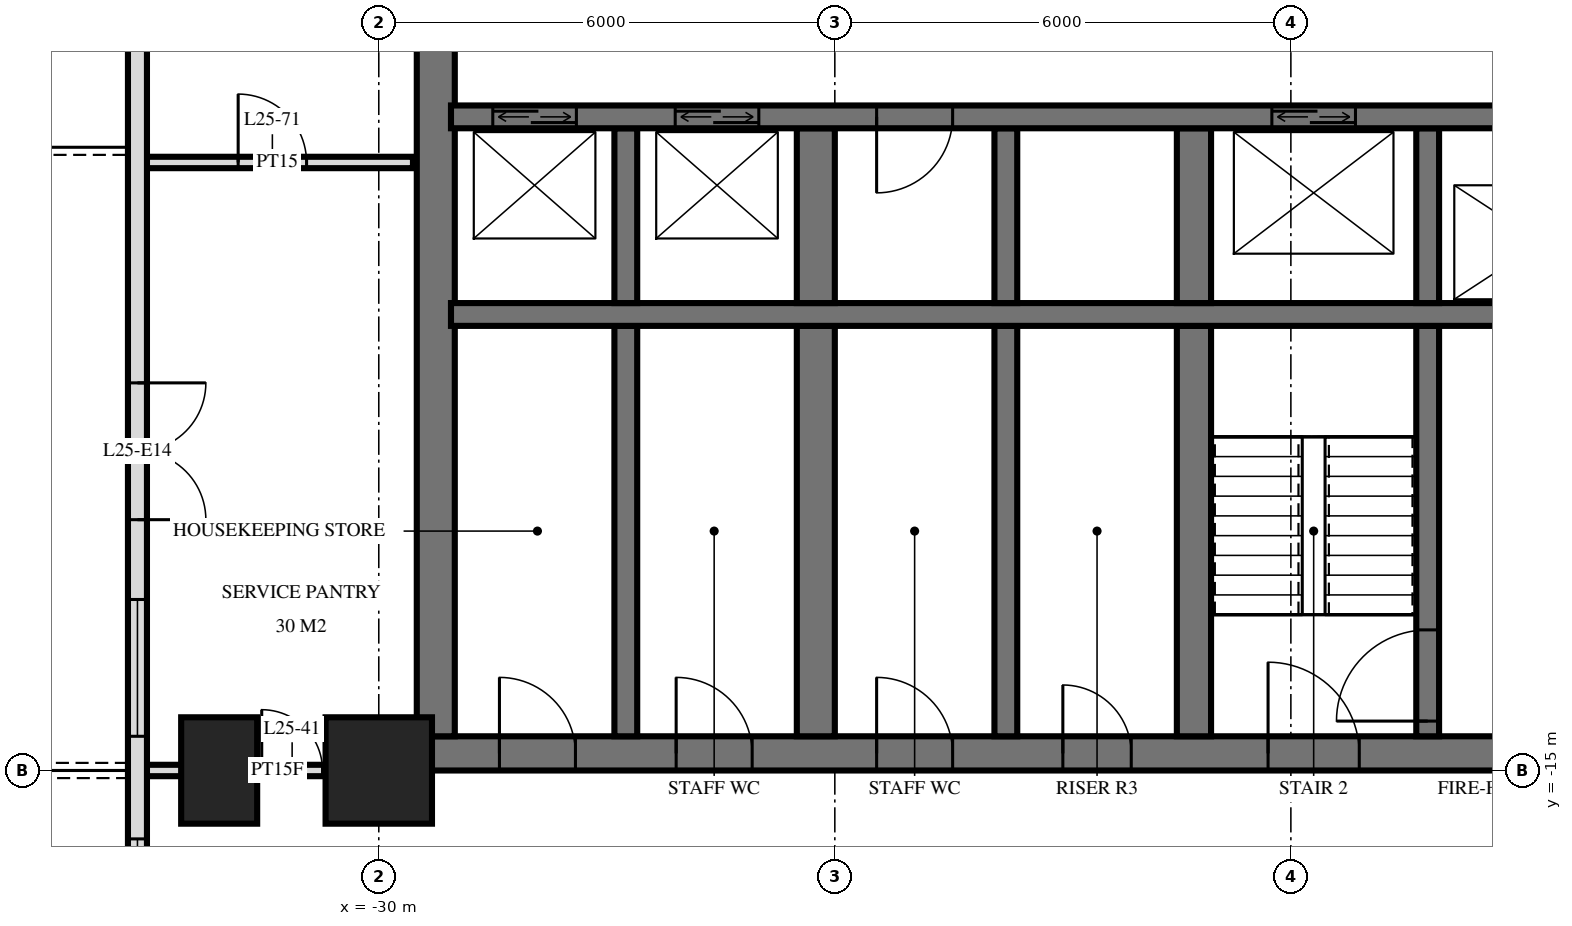
"""IFC4 building model, lengths in metres.
Left out: names, types, materials, properties, quantities, classifications, styles, units other than length and angle.
Written with IfcOpenShell. Run it as: python <this file> out.ifc"""

import sys

from ifc_helpers import new_model, si_unit, direction, frame, frame_2d, origin, origin_2d, place, context, subcontext, project, spatial, rectangle, extrude, element, fill, save


model = new_model("IFC4")
c1 = context("Model", 3, precision=1e-05, world=origin(), true_north=direction((0.0, 1.0)))
c2 = subcontext(c1, "Body", "Model", "MODEL_VIEW")
j1 = project(units=[si_unit("LENGTHUNIT", "METRE"), si_unit("PLANEANGLEUNIT", "RADIAN")], contexts=[c1])
p1 = place(None, origin())
s1 = spatial("IfcSite", under=j1, at=p1, CompositionType="ELEMENT")
p2 = place(p1, origin())
s2 = spatial("IfcBuilding", under=s1, at=p2, CompositionType="ELEMENT")
p3 = place(p2, frame((0.0, 0.0, 99.6)))
s3 = spatial("IfcBuildingStorey", under=s2, at=p3, CompositionType="ELEMENT", Elevation=99.6)
p4 = place(p3, frame((-32.1, -15.0, 0.0), z_axis=(0.0, 0.0, 1.0), x_axis=(0.0, 1.0, 0.0)))
e1 = element("IfcColumn", 1, at=p4, inside=s3, PredefinedType="COLUMN", context=c2, shape_type="SweptSolid", body=[
    extrude(rectangle(XDim=1.4, YDim=1.0, at=origin_2d()), origin(), (0.0, 0.0, 1.0), 3.6),
])
p5 = place(p3, frame((-30.0, -15.0, 0.0), z_axis=(0.0, 0.0, 1.0), x_axis=(1.0, 0.0, 0.0)))
e2 = element("IfcColumn", 2, at=p5, inside=s3, PredefinedType="COLUMN", context=c2, shape_type="SweptSolid", body=[
    extrude(rectangle(XDim=1.4, YDim=1.4, at=origin_2d()), origin(), (0.0, 0.0, 1.0), 3.6),
])
p6 = place(p3, frame((-29.5, -14.775, 0.0), z_axis=(0.0, 0.0, 1.0), x_axis=(1.0, 0.0, 0.0)))
e3 = element("IfcWall", 3, at=p6, inside=s3, PredefinedType="SHEAR", context=c2, shape_type="SweptSolid", body=[
    extrude(rectangle(XDim=19.5, YDim=0.45, at=frame_2d((9.75, 0.0))), origin(), (0.0, 0.0, 1.0), 3.6),
])
p7 = place(p6, frame((11.2, 0.0, 0.0)))
e4 = element("IfcOpeningElement", 4, at=p7, cuts=e3, PredefinedType="OPENING", context=c2, shape_type="SweptSolid", body=[
    extrude(rectangle(XDim=1.2, YDim=2.1, at=frame_2d((0.6, 1.05))), frame((0.0, 0.235, 0.0), z_axis=(0.0, -1.0, 0.0), x_axis=(1.0, 0.0, 0.0)), (0.0, 0.0, 1.0), 0.47),
])
p8 = place(p6, frame((14.25, 0.0, 0.0)))
e5 = element("IfcOpeningElement", 5, at=p8, cuts=e3, PredefinedType="OPENING", context=c2, shape_type="SweptSolid", body=[
    extrude(rectangle(XDim=1.1, YDim=2.1, at=frame_2d((0.55, 1.05))), frame((0.0, 0.235, 0.0), z_axis=(0.0, -1.0, 0.0), x_axis=(1.0, 0.0, 0.0)), (0.0, 0.0, 1.0), 0.47),
])
p9 = place(p6, frame((8.5, 0.0, 0.0)))
e6 = element("IfcOpeningElement", 6, at=p9, cuts=e3, PredefinedType="OPENING", context=c2, shape_type="SweptSolid", body=[
    extrude(rectangle(XDim=0.9, YDim=2.1, at=frame_2d((0.45, 1.05))), frame((0.0, 0.235, 0.0), z_axis=(0.0, -1.0, 0.0), x_axis=(1.0, 0.0, 0.0)), (0.0, 0.0, 1.0), 0.47),
])
p10 = place(p6, frame((6.05, 0.0, 0.0)))
e7 = element("IfcOpeningElement", 7, at=p10, cuts=e3, PredefinedType="OPENING", context=c2, shape_type="SweptSolid", body=[
    extrude(rectangle(XDim=1.0, YDim=2.1, at=frame_2d((0.5, 1.05))), frame((0.0, 0.235, 0.0), z_axis=(0.0, -1.0, 0.0), x_axis=(1.0, 0.0, 0.0)), (0.0, 0.0, 1.0), 0.47),
])
p11 = place(p6, frame((3.413, 0.0, 0.0)))
e8 = element("IfcOpeningElement", 8, at=p11, cuts=e3, PredefinedType="OPENING", context=c2, shape_type="SweptSolid", body=[
    extrude(rectangle(XDim=1.0, YDim=2.1, at=frame_2d((0.5, 1.05))), frame((0.0, 0.235, 0.0), z_axis=(0.0, -1.0, 0.0), x_axis=(1.0, 0.0, 0.0)), (0.0, 0.0, 1.0), 0.47),
])
p12 = place(p6, frame((1.087, 0.0, 0.0)))
e9 = element("IfcOpeningElement", 9, at=p12, cuts=e3, PredefinedType="OPENING", context=c2, shape_type="SweptSolid", body=[
    extrude(rectangle(XDim=1.0, YDim=2.1, at=frame_2d((0.5, 1.05))), frame((0.0, 0.235, 0.0), z_axis=(0.0, -1.0, 0.0), x_axis=(1.0, 0.0, 0.0)), (0.0, 0.0, 1.0), 0.47),
])
p13 = place(p3, frame((-29.25, -14.55, 0.0), z_axis=(0.0, 0.0, 1.0), x_axis=(0.0, 1.0, 0.0)))
e10 = element("IfcWall", 10, at=p13, inside=s3, PredefinedType="SHEAR", context=c2, shape_type="SweptSolid", body=[
    extrude(rectangle(XDim=14.1, YDim=0.5, at=frame_2d((7.05, 0.0))), origin(), (0.0, 0.0, 1.0), 3.6),
])
p14 = place(p3, frame((-29.05, -6.4, 0.0), z_axis=(0.0, 0.0, 1.0), x_axis=(1.0, 0.0, 0.0)))
e11 = element("IfcWall", 11, at=p14, inside=s3, PredefinedType="SHEAR", context=c2, shape_type="SweptSolid", body=[
    extrude(rectangle(XDim=18.7, YDim=0.3, at=frame_2d((9.35, 0.0))), origin(), (0.0, 0.0, 1.0), 3.6),
])
p15 = place(p14, frame((2.95, 0.0, 0.0)))
e12 = element("IfcOpeningElement", 12, at=p15, cuts=e11, PredefinedType="OPENING", context=c2, shape_type="SweptSolid", body=[
    extrude(rectangle(XDim=1.1, YDim=2.1, at=frame_2d((0.55, 1.05))), frame((0.0, 0.16, 0.0), z_axis=(0.0, -1.0, 0.0), x_axis=(1.0, 0.0, 0.0)), (0.0, 0.0, 1.0), 0.32),
])
p16 = place(p14, frame((0.55, 0.0, 0.0)))
e13 = element("IfcOpeningElement", 13, at=p16, cuts=e11, PredefinedType="OPENING", context=c2, shape_type="SweptSolid", body=[
    extrude(rectangle(XDim=1.1, YDim=2.1, at=frame_2d((0.55, 1.05))), frame((0.0, 0.16, 0.0), z_axis=(0.0, -1.0, 0.0), x_axis=(1.0, 0.0, 0.0)), (0.0, 0.0, 1.0), 0.32),
])
p17 = place(p14, frame((10.8, 0.0, 0.0)))
e14 = element("IfcOpeningElement", 14, at=p17, cuts=e11, PredefinedType="OPENING", context=c2, shape_type="SweptSolid", body=[
    extrude(rectangle(XDim=1.1, YDim=2.1, at=frame_2d((0.55, 1.05))), frame((0.0, 0.16, 0.0), z_axis=(0.0, -1.0, 0.0), x_axis=(1.0, 0.0, 0.0)), (0.0, 0.0, 1.0), 0.32),
])
p18 = place(p14, frame((5.6, 0.0, 0.0)))
e15 = element("IfcOpeningElement", 15, at=p18, cuts=e11, PredefinedType="OPENING", context=c2, shape_type="SweptSolid", body=[
    extrude(rectangle(XDim=1.0, YDim=2.1, at=frame_2d((0.5, 1.05))), frame((0.0, 0.16, 0.0), z_axis=(0.0, -1.0, 0.0), x_axis=(1.0, 0.0, 0.0)), (0.0, 0.0, 1.0), 0.32),
])
p19 = place(p3, frame((-29.05, -9.0, 0.0), z_axis=(0.0, 0.0, 1.0), x_axis=(1.0, 0.0, 0.0)))
e16 = element("IfcWall", 16, at=p19, inside=s3, PredefinedType="SHEAR", context=c2, shape_type="SweptSolid", body=[
    extrude(rectangle(XDim=18.7, YDim=0.3, at=frame_2d((9.35, 0.0))), origin(), (0.0, 0.0, 1.0), 3.6),
])
p20 = place(p19, frame((13.8, 0.0, 0.0)))
e17 = element("IfcOpeningElement", 17, at=p20, cuts=e16, PredefinedType="OPENING", context=c2, shape_type="SweptSolid", body=[
    extrude(rectangle(XDim=1.1, YDim=2.1, at=frame_2d((0.55, 1.05))), frame((0.0, 0.16, 0.0), z_axis=(0.0, -1.0, 0.0), x_axis=(1.0, 0.0, 0.0)), (0.0, 0.0, 1.0), 0.32),
])
p21 = place(p3, frame((-16.2, -8.85, 0.0), z_axis=(0.0, 0.0, 1.0), x_axis=(0.0, 1.0, 0.0)))
e18 = element("IfcWall", 18, at=p21, inside=s3, PredefinedType="SHEAR", context=c2, shape_type="SweptSolid", body=[
    extrude(rectangle(XDim=2.3, YDim=0.3, at=frame_2d((1.15, 0.0))), origin(), (0.0, 0.0, 1.0), 3.6),
])
p22 = place(p3, frame((-16.2, -14.55, 0.0), z_axis=(0.0, 0.0, 1.0), x_axis=(0.0, 1.0, 0.0)))
e19 = element("IfcWall", 19, at=p22, inside=s3, PredefinedType="SHEAR", context=c2, shape_type="SweptSolid", body=[
    extrude(rectangle(XDim=5.4, YDim=0.3, at=frame_2d((2.7, 0.0))), origin(), (0.0, 0.0, 1.0), 3.6),
])
p23 = place(p22, frame((0.2, 0.0, 0.0)))
e20 = element("IfcOpeningElement", 20, at=p23, cuts=e19, PredefinedType="OPENING", context=c2, shape_type="SweptSolid", body=[
    extrude(rectangle(XDim=1.2, YDim=2.1, at=frame_2d((0.6, 1.05))), frame((0.0, 0.16, 0.0), z_axis=(0.0, -1.0, 0.0), x_axis=(1.0, 0.0, 0.0)), (0.0, 0.0, 1.0), 0.32),
])
p24 = place(p3, frame((-19.275, -8.85, 0.0), z_axis=(0.0, 0.0, 1.0), x_axis=(0.0, 1.0, 0.0)))
e21 = element("IfcWall", 21, at=p24, inside=s3, PredefinedType="SHEAR", context=c2, shape_type="SweptSolid", body=[
    extrude(rectangle(XDim=2.3, YDim=0.45, at=frame_2d((1.15, 0.0))), origin(), (0.0, 0.0, 1.0), 3.6),
])
p25 = place(p3, frame((-19.275, -14.55, 0.0), z_axis=(0.0, 0.0, 1.0), x_axis=(0.0, 1.0, 0.0)))
e22 = element("IfcWall", 22, at=p25, inside=s3, PredefinedType="SHEAR", context=c2, shape_type="SweptSolid", body=[
    extrude(rectangle(XDim=5.4, YDim=0.45, at=frame_2d((2.7, 0.0))), origin(), (0.0, 0.0, 1.0), 3.6),
])
p26 = place(p3, frame((-21.75, -8.85, 0.0), z_axis=(0.0, 0.0, 1.0), x_axis=(0.0, 1.0, 0.0)))
e23 = element("IfcWall", 23, at=p26, inside=s3, PredefinedType="SHEAR", context=c2, shape_type="SweptSolid", body=[
    extrude(rectangle(XDim=2.3, YDim=0.3, at=frame_2d((1.15, 0.0))), origin(), (0.0, 0.0, 1.0), 3.6),
])
p27 = place(p3, frame((-21.75, -14.55, 0.0), z_axis=(0.0, 0.0, 1.0), x_axis=(0.0, 1.0, 0.0)))
e24 = element("IfcWall", 24, at=p27, inside=s3, PredefinedType="SHEAR", context=c2, shape_type="SweptSolid", body=[
    extrude(rectangle(XDim=5.4, YDim=0.3, at=frame_2d((2.7, 0.0))), origin(), (0.0, 0.0, 1.0), 3.6),
])
p28 = place(p3, frame((-24.25, -8.85, 0.0), z_axis=(0.0, 0.0, 1.0), x_axis=(0.0, 1.0, 0.0)))
e25 = element("IfcWall", 25, at=p28, inside=s3, PredefinedType="SHEAR", context=c2, shape_type="SweptSolid", body=[
    extrude(rectangle(XDim=2.3, YDim=0.5, at=frame_2d((1.15, 0.0))), origin(), (0.0, 0.0, 1.0), 3.6),
])
p29 = place(p3, frame((-24.25, -14.55, 0.0), z_axis=(0.0, 0.0, 1.0), x_axis=(0.0, 1.0, 0.0)))
e26 = element("IfcWall", 26, at=p29, inside=s3, PredefinedType="SHEAR", context=c2, shape_type="SweptSolid", body=[
    extrude(rectangle(XDim=5.4, YDim=0.5, at=frame_2d((2.7, 0.0))), origin(), (0.0, 0.0, 1.0), 3.6),
])
p30 = place(p3, frame((-26.75, -8.85, 0.0), z_axis=(0.0, 0.0, 1.0), x_axis=(0.0, 1.0, 0.0)))
e27 = element("IfcWall", 27, at=p30, inside=s3, PredefinedType="SHEAR", context=c2, shape_type="SweptSolid", body=[
    extrude(rectangle(XDim=2.3, YDim=0.3, at=frame_2d((1.15, 0.0))), origin(), (0.0, 0.0, 1.0), 3.6),
])
p31 = place(p3, frame((-26.75, -14.55, 0.0), z_axis=(0.0, 0.0, 1.0), x_axis=(0.0, 1.0, 0.0)))
e28 = element("IfcWall", 28, at=p31, inside=s3, PredefinedType="SHEAR", context=c2, shape_type="SweptSolid", body=[
    extrude(rectangle(XDim=5.4, YDim=0.3, at=frame_2d((2.7, 0.0))), origin(), (0.0, 0.0, 1.0), 3.6),
])
p32 = place(p3, frame((-33.175, -3.325, 0.0), z_axis=(0.0, 0.0, 1.0), x_axis=(0.0, -1.0, 0.0)))
e29 = element("IfcWall", 29, at=p32, inside=s3, PredefinedType="SOLIDWALL", context=c2, shape_type="SweptSolid", body=[
    extrude(rectangle(XDim=21.551, YDim=0.25, at=frame_2d((10.775, 0.0))), origin(), (0.0, 0.0, 1.0), 3.32),
])
p33 = place(p32, frame((6.575, 0.0, 0.0)))
e30 = element("IfcOpeningElement", 30, at=p33, cuts=e29, PredefinedType="OPENING", context=c2, shape_type="SweptSolid", body=[
    extrude(rectangle(XDim=1.8, YDim=2.4, at=frame_2d((0.9, 1.2))), frame((0.0, 0.135, 0.0), z_axis=(0.0, -1.0, 0.0), x_axis=(1.0, 0.0, 0.0)), (0.0, 0.0, 1.0), 0.27),
])
p34 = place(p32, frame((9.425, 0.0, 0.3)))
e31 = element("IfcOpeningElement", 31, at=p34, cuts=e29, PredefinedType="OPENING", context=c2, shape_type="SweptSolid", body=[
    extrude(rectangle(XDim=1.8, YDim=2.1, at=frame_2d((0.9, 1.05))), frame((0.0, 0.135, 0.0), z_axis=(0.0, -1.0, 0.0), x_axis=(1.0, 0.0, 0.0)), (0.0, 0.0, 1.0), 0.27),
])
p35 = place(p32, frame((12.575, 0.0, 0.3)))
e32 = element("IfcOpeningElement", 32, at=p35, cuts=e29, PredefinedType="OPENING", context=c2, shape_type="SweptSolid", body=[
    extrude(rectangle(XDim=1.2, YDim=2.1, at=frame_2d((0.6, 1.05))), frame((0.0, 0.135, 0.0), z_axis=(0.0, -1.0, 0.0), x_axis=(1.0, 0.0, 0.0)), (0.0, 0.0, 1.0), 0.27),
])
p36 = place(p32, frame((15.575, 0.0, 0.0)))
e33 = element("IfcOpeningElement", 33, at=p36, cuts=e29, PredefinedType="OPENING", context=c2, shape_type="SweptSolid", body=[
    extrude(rectangle(XDim=1.8, YDim=2.4, at=frame_2d((0.9, 1.2))), frame((0.0, 0.135, 0.0), z_axis=(0.0, -1.0, 0.0), x_axis=(1.0, 0.0, 0.0)), (0.0, 0.0, 1.0), 0.27),
])
p37 = place(p32, frame((18.875, 0.0, 0.0)))
e34 = element("IfcOpeningElement", 34, at=p37, cuts=e29, PredefinedType="OPENING", context=c2, shape_type="SweptSolid", body=[
    extrude(rectangle(XDim=1.8, YDim=2.4, at=frame_2d((0.9, 1.2))), frame((0.0, 0.135, 0.0), z_axis=(0.0, -1.0, 0.0), x_axis=(1.0, 0.0, 0.0)), (0.0, 0.0, 1.0), 0.27),
])
p38 = place(p3, frame((-33.12, -15.0, 0.0), z_axis=(0.0, 0.0, 1.0), x_axis=(1.0, 0.0, 0.0)))
e35 = element("IfcWall", 35, at=p38, inside=s3, PredefinedType="PARTITIONING", context=c2, shape_type="SweptSolid", body=[
    extrude(rectangle(XDim=3.57, YDim=0.15, at=frame_2d((1.785, 0.0))), origin(), (0.0, 0.0, 1.0), 3.32),
])
p39 = place(p38, frame((1.58, 0.0, 0.0)))
e36 = element("IfcOpeningElement", 36, at=p39, cuts=e35, PredefinedType="OPENING", context=c2, shape_type="SweptSolid", body=[
    extrude(rectangle(XDim=0.8, YDim=2.1, at=frame_2d((0.4, 1.05))), frame((0.0, 0.085, 0.0), z_axis=(0.0, -1.0, 0.0), x_axis=(1.0, 0.0, 0.0)), (0.0, 0.0, 1.0), 0.17),
])
p40 = place(p3, frame((-33.12, -7.0, 0.0), z_axis=(0.0, 0.0, 1.0), x_axis=(1.0, 0.0, 0.0)))
e37 = element("IfcWall", 37, at=p40, inside=s3, PredefinedType="PARTITIONING", context=c2, shape_type="SweptSolid", body=[
    extrude(rectangle(XDim=3.57, YDim=0.15, at=frame_2d((1.785, 0.0))), origin(), (0.0, 0.0, 1.0), 3.32),
])
p41 = place(p40, frame((1.27, 0.0, 0.0)))
e38 = element("IfcOpeningElement", 38, at=p41, cuts=e37, PredefinedType="OPENING", context=c2, shape_type="SweptSolid", body=[
    extrude(rectangle(XDim=0.9, YDim=2.1, at=frame_2d((0.45, 1.05))), frame((0.0, 0.085, 0.0), z_axis=(0.0, -1.0, 0.0), x_axis=(1.0, 0.0, 0.0)), (0.0, 0.0, 1.0), 0.17),
])
p42 = place(p33, origin())
e39 = element("IfcDoor", 39, at=p42, inside=s3, OperationType="DOUBLE_DOOR_SINGLE_SWING", PredefinedType="DOOR", context=c2, shape_type="SweptSolid", body=[
    extrude(rectangle(XDim=1.8, YDim=2.4, at=frame_2d((0.9, 1.2))), frame((0.0, 0.025, 0.0), z_axis=(0.0, -1.0, 0.0), x_axis=(1.0, 0.0, 0.0)), (0.0, 0.0, 1.0), 0.05),
])
fill(e30, e39)
p43 = place(p34, origin())
e40 = element("IfcWindow", 40, at=p43, inside=s3, PartitioningType="SINGLE_PANEL", PredefinedType="WINDOW", context=c2, shape_type="SweptSolid", body=[
    extrude(rectangle(XDim=1.8, YDim=2.1, at=frame_2d((0.9, 1.05))), frame((0.0, 0.03, 0.0), z_axis=(0.0, -1.0, 0.0), x_axis=(1.0, 0.0, 0.0)), (0.0, 0.0, 1.0), 0.06),
])
fill(e31, e40)
p44 = place(p35, origin())
e41 = element("IfcWindow", 41, at=p44, inside=s3, PartitioningType="SINGLE_PANEL", PredefinedType="WINDOW", context=c2, shape_type="SweptSolid", body=[
    extrude(rectangle(XDim=1.2, YDim=2.1, at=frame_2d((0.6, 1.05))), frame((0.0, 0.03, 0.0), z_axis=(0.0, -1.0, 0.0), x_axis=(1.0, 0.0, 0.0)), (0.0, 0.0, 1.0), 0.06),
])
fill(e32, e41)
p45 = place(p15, origin())
e42 = element("IfcDoor", 42, at=p45, inside=s3, OperationType="DOUBLE_DOOR_SLIDING", PredefinedType="USERDEFINED", context=c2, shape_type="SweptSolid", body=[
    extrude(rectangle(XDim=1.1, YDim=2.1, at=frame_2d((0.55, 1.05))), frame((0.0, 0.025, 0.0), z_axis=(0.0, -1.0, 0.0), x_axis=(1.0, 0.0, 0.0)), (0.0, 0.0, 1.0), 0.05),
])
fill(e12, e42)
p46 = place(p16, origin())
e43 = element("IfcDoor", 43, at=p46, inside=s3, OperationType="DOUBLE_DOOR_SLIDING", PredefinedType="USERDEFINED", context=c2, shape_type="SweptSolid", body=[
    extrude(rectangle(XDim=1.1, YDim=2.1, at=frame_2d((0.55, 1.05))), frame((0.0, 0.025, 0.0), z_axis=(0.0, -1.0, 0.0), x_axis=(1.0, 0.0, 0.0)), (0.0, 0.0, 1.0), 0.05),
])
fill(e13, e43)
p47 = place(p17, origin())
e44 = element("IfcDoor", 44, at=p47, inside=s3, OperationType="DOUBLE_DOOR_SLIDING", PredefinedType="USERDEFINED", context=c2, shape_type="SweptSolid", body=[
    extrude(rectangle(XDim=1.1, YDim=2.1, at=frame_2d((0.55, 1.05))), frame((0.0, 0.025, 0.0), z_axis=(0.0, -1.0, 0.0), x_axis=(1.0, 0.0, 0.0)), (0.0, 0.0, 1.0), 0.05),
])
fill(e14, e44)
p48 = place(p7, origin())
e45 = element("IfcDoor", 45, at=p48, inside=s3, OperationType="SINGLE_SWING_RIGHT", PredefinedType="DOOR", context=c2, shape_type="SweptSolid", body=[
    extrude(rectangle(XDim=1.2, YDim=2.1, at=frame_2d((0.6, 1.05))), frame((0.0, 0.025, 0.0), z_axis=(0.0, -1.0, 0.0), x_axis=(1.0, 0.0, 0.0)), (0.0, 0.0, 1.0), 0.05),
])
fill(e4, e45)
p49 = place(p9, origin())
e46 = element("IfcDoor", 46, at=p49, inside=s3, OperationType="SINGLE_SWING_RIGHT", PredefinedType="DOOR", context=c2, shape_type="SweptSolid", body=[
    extrude(rectangle(XDim=0.9, YDim=2.1, at=frame_2d((0.45, 1.05))), frame((0.0, 0.025, 0.0), z_axis=(0.0, -1.0, 0.0), x_axis=(1.0, 0.0, 0.0)), (0.0, 0.0, 1.0), 0.05),
])
fill(e6, e46)
p50 = place(p10, origin())
e47 = element("IfcDoor", 47, at=p50, inside=s3, OperationType="SINGLE_SWING_RIGHT", PredefinedType="DOOR", context=c2, shape_type="SweptSolid", body=[
    extrude(rectangle(XDim=1.0, YDim=2.1, at=frame_2d((0.5, 1.05))), frame((0.0, 0.025, 0.0), z_axis=(0.0, -1.0, 0.0), x_axis=(1.0, 0.0, 0.0)), (0.0, 0.0, 1.0), 0.05),
])
fill(e7, e47)
p51 = place(p11, origin())
e48 = element("IfcDoor", 48, at=p51, inside=s3, OperationType="SINGLE_SWING_RIGHT", PredefinedType="DOOR", context=c2, shape_type="SweptSolid", body=[
    extrude(rectangle(XDim=1.0, YDim=2.1, at=frame_2d((0.5, 1.05))), frame((0.0, 0.025, 0.0), z_axis=(0.0, -1.0, 0.0), x_axis=(1.0, 0.0, 0.0)), (0.0, 0.0, 1.0), 0.05),
])
fill(e8, e48)
p52 = place(p12, origin())
e49 = element("IfcDoor", 49, at=p52, inside=s3, OperationType="SINGLE_SWING_RIGHT", PredefinedType="DOOR", context=c2, shape_type="SweptSolid", body=[
    extrude(rectangle(XDim=1.0, YDim=2.1, at=frame_2d((0.5, 1.05))), frame((0.0, 0.025, 0.0), z_axis=(0.0, -1.0, 0.0), x_axis=(1.0, 0.0, 0.0)), (0.0, 0.0, 1.0), 0.05),
])
fill(e9, e49)
p53 = place(p18, frame((0.5, 0.0, 0.0), z_axis=(0.0, 0.0, 1.0), x_axis=(-1.0, 0.0, 0.0)))
e50 = element("IfcDoor", 50, at=p53, inside=s3, OperationType="SINGLE_SWING_LEFT", PredefinedType="DOOR", context=c2, shape_type="SweptSolid", body=[
    extrude(rectangle(XDim=1.0, YDim=2.1, at=frame_2d((0.0, 1.05))), frame((0.0, -0.025, 0.0), z_axis=(0.0, 1.0, 0.0), x_axis=(-1.0, 0.0, 0.0)), (0.0, 0.0, 1.0), 0.05),
])
fill(e15, e50)
p54 = place(p23, origin())
e51 = element("IfcDoor", 51, at=p54, inside=s3, OperationType="SINGLE_SWING_RIGHT", PredefinedType="DOOR", context=c2, shape_type="SweptSolid", body=[
    extrude(rectangle(XDim=1.2, YDim=2.1, at=frame_2d((0.6, 1.05))), frame((0.0, 0.025, 0.0), z_axis=(0.0, -1.0, 0.0), x_axis=(1.0, 0.0, 0.0)), (0.0, 0.0, 1.0), 0.05),
])
fill(e20, e51)
p55 = place(p39, origin())
e52 = element("IfcDoor", 52, at=p55, inside=s3, OperationType="SINGLE_SWING_RIGHT", PredefinedType="DOOR", context=c2, shape_type="SweptSolid", body=[
    extrude(rectangle(XDim=0.8, YDim=2.1, at=frame_2d((0.4, 1.05))), frame((0.0, 0.025, 0.0), z_axis=(0.0, -1.0, 0.0), x_axis=(1.0, 0.0, 0.0)), (0.0, 0.0, 1.0), 0.05),
])
fill(e36, e52)
p56 = place(p41, origin())
e53 = element("IfcDoor", 53, at=p56, inside=s3, OperationType="SINGLE_SWING_RIGHT", PredefinedType="DOOR", context=c2, shape_type="SweptSolid", body=[
    extrude(rectangle(XDim=0.9, YDim=2.1, at=frame_2d((0.45, 1.05))), frame((0.0, 0.025, 0.0), z_axis=(0.0, -1.0, 0.0), x_axis=(1.0, 0.0, 0.0)), (0.0, 0.0, 1.0), 0.05),
])
fill(e38, e53)
save(model, sys.argv[1])
